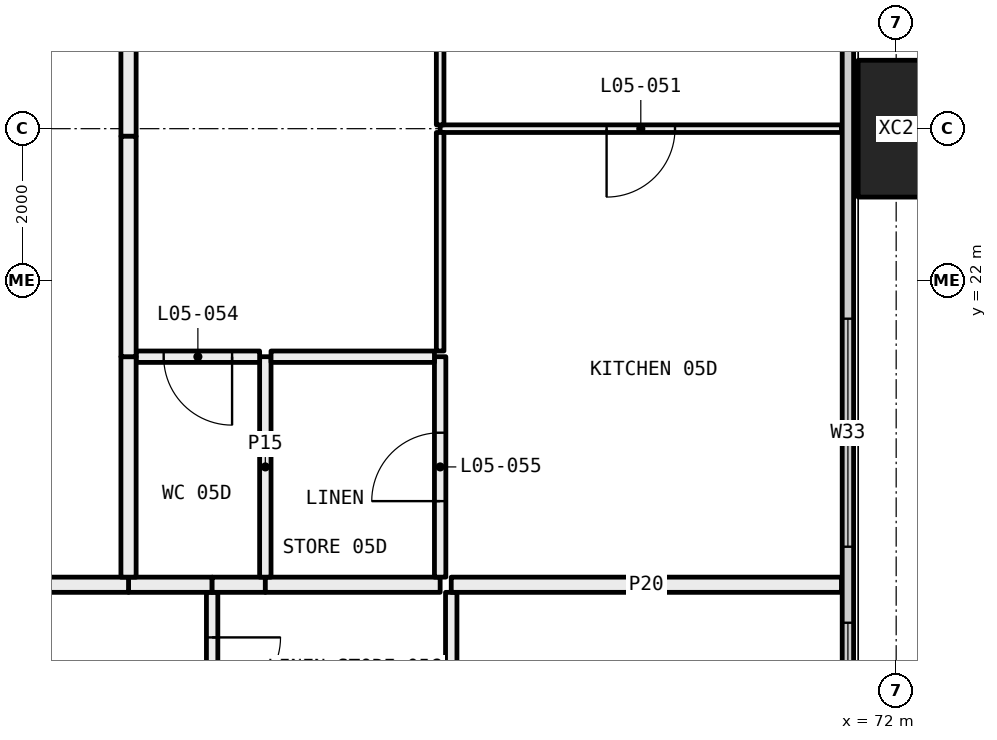
"""IFC4 building model, lengths in metres.
Left out: names, types, materials, properties, quantities, classifications, styles, units other than length and angle.
Written with IfcOpenShell. Run it as: python <this file> out.ifc"""

import sys

from ifc_helpers import new_model, si_unit, direction, frame, frame_2d, origin, origin_2d, place, context, subcontext, project, spatial, rectangle, hollow_rectangle, extrude, element, fill, save


model = new_model("IFC4")
c1 = context("Model", 3, precision=1e-05, world=origin(), true_north=direction((0.0, 1.0)))
c2 = subcontext(c1, "Body", "Model", "MODEL_VIEW")
j1 = project(units=[si_unit("LENGTHUNIT", "METRE"), si_unit("PLANEANGLEUNIT", "RADIAN")], contexts=[c1])
p1 = place(None, origin())
s1 = spatial("IfcSite", under=j1, at=p1, CompositionType="ELEMENT")
p2 = place(p1, origin())
s2 = spatial("IfcBuilding", under=s1, at=p2, CompositionType="ELEMENT")
p3 = place(p2, frame((0.0, 0.0, 30.0)))
s3 = spatial("IfcBuildingStorey", under=s2, at=p3, CompositionType="ELEMENT", Elevation=30.0)
p4 = place(p3, frame((72.0, 24.0, -0.4), z_axis=(0.0, 0.0, 1.0), x_axis=(0.0, 1.0, 0.0)))
e1 = element("IfcColumn", 1, at=p4, inside=s3, PredefinedType="COLUMN", context=c2, shape_type="SweptSolid", body=[
    extrude(hollow_rectangle(XDim=1.8, YDim=1.0, WallThickness=0.07, at=origin_2d()), origin(), (0.0, 0.0, 1.0), 3.45),
])
p5 = place(p3, frame((71.365, 6.71, 0.0), z_axis=(0.0, 0.0, 1.0), x_axis=(0.0, 1.0, 0.0)))
e2 = element("IfcWall", 2, at=p5, inside=s3, PredefinedType="ELEMENTEDWALL", context=c2, shape_type="SweptSolid", body=[
    extrude(rectangle(XDim=34.58, YDim=0.15, at=frame_2d((17.29, 0.0))), origin(), (0.0, 0.0, 1.0), 3.05),
])
p6 = place(p5, frame((0.29, 0.0, 0.45)))
e3 = element("IfcOpeningElement", 3, at=p6, cuts=e2, PredefinedType="OPENING", context=c2, shape_type="SweptSolid", body=[
    extrude(rectangle(XDim=4.5, YDim=2.55, at=frame_2d((2.25, 1.275))), frame((0.0, 0.085, 0.0), z_axis=(0.0, -1.0, 0.0), x_axis=(1.0, 0.0, 0.0)), (0.0, 0.0, 1.0), 0.17),
])
p7 = place(p5, frame((7.79, 0.0, 0.45)))
e4 = element("IfcOpeningElement", 4, at=p7, cuts=e2, PredefinedType="OPENING", context=c2, shape_type="SweptSolid", body=[
    extrude(rectangle(XDim=3.0, YDim=2.55, at=frame_2d((1.5, 1.275))), frame((0.0, 0.085, 0.0), z_axis=(0.0, -1.0, 0.0), x_axis=(1.0, 0.0, 0.0)), (0.0, 0.0, 1.0), 0.17),
])
p8 = place(p5, frame((11.79, 0.0, 0.45)))
e5 = element("IfcOpeningElement", 5, at=p8, cuts=e2, PredefinedType="OPENING", context=c2, shape_type="SweptSolid", body=[
    extrude(rectangle(XDim=3.0, YDim=2.55, at=frame_2d((1.5, 1.275))), frame((0.0, 0.085, 0.0), z_axis=(0.0, -1.0, 0.0), x_axis=(1.0, 0.0, 0.0)), (0.0, 0.0, 1.0), 0.17),
])
p9 = place(p5, frame((19.79, 0.0, 0.45)))
e6 = element("IfcOpeningElement", 6, at=p9, cuts=e2, PredefinedType="OPENING", context=c2, shape_type="SweptSolid", body=[
    extrude(rectangle(XDim=3.0, YDim=2.55, at=frame_2d((1.5, 1.275))), frame((0.0, 0.085, 0.0), z_axis=(0.0, -1.0, 0.0), x_axis=(1.0, 0.0, 0.0)), (0.0, 0.0, 1.0), 0.17),
])
p10 = place(p5, frame((23.79, 0.0, 0.45)))
e7 = element("IfcOpeningElement", 7, at=p10, cuts=e2, PredefinedType="OPENING", context=c2, shape_type="SweptSolid", body=[
    extrude(rectangle(XDim=2.0, YDim=2.55, at=frame_2d((1.0, 1.275))), frame((0.0, 0.085, 0.0), z_axis=(0.0, -1.0, 0.0), x_axis=(1.0, 0.0, 0.0)), (0.0, 0.0, 1.0), 0.17),
])
p11 = place(p5, frame((29.79, 0.0, 0.45)))
e8 = element("IfcOpeningElement", 8, at=p11, cuts=e2, PredefinedType="OPENING", context=c2, shape_type="SweptSolid", body=[
    extrude(rectangle(XDim=4.5, YDim=2.55, at=frame_2d((2.25, 1.275))), frame((0.0, 0.085, 0.0), z_axis=(0.0, -1.0, 0.0), x_axis=(1.0, 0.0, 0.0)), (0.0, 0.0, 1.0), 0.17),
])
p12 = place(p3, frame((63.0, 15.814, 0.0), z_axis=(0.0, 0.0, 1.0), x_axis=(0.0, 1.0, 0.0)))
e9 = element("IfcWall", 9, at=p12, inside=s3, PredefinedType="PARTITIONING", context=c2, shape_type="SweptSolid", body=[
    extrude(rectangle(XDim=2.086, YDim=0.15, at=frame_2d((1.043, 0.0))), origin(), (0.0, 0.0, 1.0), 3.05),
])
p13 = place(p12, frame((0.593, 0.0, 0.0)))
e10 = element("IfcOpeningElement", 10, at=p13, cuts=e9, PredefinedType="OPENING", context=c2, shape_type="SweptSolid", body=[
    extrude(rectangle(XDim=0.9, YDim=2.1, at=frame_2d((0.45, 1.05))), frame((0.0, 0.085, 0.0), z_axis=(0.0, -1.0, 0.0), x_axis=(1.0, 0.0, 0.0)), (0.0, 0.0, 1.0), 0.17),
])
p14 = place(p3, frame((63.0, 18.0, 0.0), z_axis=(0.0, 0.0, 1.0), x_axis=(-1.0, 0.0, 0.0)))
e11 = element("IfcWall", 11, at=p14, inside=s3, PredefinedType="PARTITIONING", context=c2, shape_type="SweptSolid", body=[
    extrude(rectangle(XDim=1.1, YDim=0.2, at=frame_2d((0.55, 0.0))), origin(), (0.0, 0.0, 1.0), 3.05),
])
p15 = place(p3, frame((61.9, 18.0, 0.0), z_axis=(0.0, 0.0, 1.0), x_axis=(-1.0, 0.0, 0.0)))
e12 = element("IfcWall", 12, at=p15, inside=s3, PredefinedType="PARTITIONING", context=c2, shape_type="SweptSolid", body=[
    extrude(rectangle(XDim=1.9, YDim=0.2, at=frame_2d((0.95, 0.0))), origin(), (0.0, 0.0, 1.0), 3.05),
])
p16 = place(p3, frame((66.146, 17.9, 0.0), z_axis=(0.0, 0.0, 1.0), x_axis=(0.0, -1.0, 0.0)))
e13 = element("IfcWall", 13, at=p16, inside=s3, PredefinedType="PARTITIONING", context=c2, shape_type="SweptSolid", body=[
    extrude(rectangle(XDim=2.086, YDim=0.15, at=frame_2d((1.043, 0.0))), origin(), (0.0, 0.0, 1.0), 2.55),
])
p17 = place(p3, frame((71.28, 18.0, 0.0), z_axis=(0.0, 0.0, 1.0), x_axis=(-1.0, 0.0, 0.0)))
e14 = element("IfcWall", 14, at=p17, inside=s3, PredefinedType="PARTITIONING", context=c2, shape_type="SweptSolid", body=[
    extrude(rectangle(XDim=5.134, YDim=0.2, at=frame_2d((2.567, 0.0))), origin(), (0.0, 0.0, 1.0), 3.05),
])
p18 = place(p3, frame((63.7, 18.0, 0.0), z_axis=(0.0, 0.0, 1.0), x_axis=(-1.0, 0.0, 0.0)))
e15 = element("IfcWall", 15, at=p18, inside=s3, PredefinedType="PARTITIONING", context=c2, shape_type="SweptSolid", body=[
    extrude(rectangle(XDim=0.7, YDim=0.2, at=frame_2d((0.35, 0.0))), origin(), (0.0, 0.0, 1.0), 3.05),
])
p19 = place(p3, frame((66.0, 18.0, 0.0), z_axis=(0.0, 0.0, 1.0), x_axis=(-1.0, 0.0, 0.0)))
e16 = element("IfcWall", 16, at=p19, inside=s3, PredefinedType="PARTITIONING", context=c2, shape_type="SweptSolid", body=[
    extrude(rectangle(XDim=2.3, YDim=0.2, at=frame_2d((1.15, 0.0))), origin(), (0.0, 0.0, 1.0), 3.05),
])
p20 = place(p3, frame((71.28, 24.0, 0.0), z_axis=(0.0, 0.0, 1.0), x_axis=(-1.0, 0.0, 0.0)))
e17 = element("IfcWall", 17, at=p20, inside=s3, PredefinedType="PARTITIONING", context=c2, shape_type="SweptSolid", body=[
    extrude(rectangle(XDim=5.28, YDim=0.1, at=frame_2d((2.64, 0.0))), origin(), (0.0, 0.0, 1.0), 2.45),
])
p21 = place(p20, frame((2.19, 0.0, 0.0)))
e18 = element("IfcOpeningElement", 18, at=p21, cuts=e17, PredefinedType="OPENING", context=c2, shape_type="SweptSolid", body=[
    extrude(rectangle(XDim=0.9, YDim=2.1, at=frame_2d((0.45, 1.05))), frame((0.0, 0.06, 0.0), z_axis=(0.0, -1.0, 0.0), x_axis=(1.0, 0.0, 0.0)), (0.0, 0.0, 1.0), 0.12),
])
p22 = place(p3, frame((66.0, 21.0, 0.0), z_axis=(0.0, 0.0, 1.0), x_axis=(0.0, -1.0, 0.0)))
e19 = element("IfcWall", 19, at=p22, inside=s3, PredefinedType="PARTITIONING", context=c2, shape_type="SweptSolid", body=[
    extrude(rectangle(XDim=2.9, YDim=0.15, at=frame_2d((1.45, 0.0))), origin(), (0.0, 0.0, 1.0), 3.05),
])
p23 = place(p22, frame((1.0, 0.0, 0.0)))
e20 = element("IfcOpeningElement", 20, at=p23, cuts=e19, PredefinedType="OPENING", context=c2, shape_type="SweptSolid", body=[
    extrude(rectangle(XDim=0.9, YDim=2.1, at=frame_2d((0.45, 1.05))), frame((0.0, 0.085, 0.0), z_axis=(0.0, -1.0, 0.0), x_axis=(1.0, 0.0, 0.0)), (0.0, 0.0, 1.0), 0.17),
])
p24 = place(p3, frame((66.0, 23.95, 0.0), z_axis=(0.0, 0.0, 1.0), x_axis=(0.0, -1.0, 0.0)))
e21 = element("IfcWall", 21, at=p24, inside=s3, PredefinedType="PARTITIONING", context=c2, shape_type="SweptSolid", body=[
    extrude(rectangle(XDim=2.875, YDim=0.1, at=frame_2d((1.438, 0.0))), origin(), (0.0, 0.0, 1.0), 2.45),
])
p25 = place(p3, frame((66.0, 33.0, 0.0), z_axis=(0.0, 0.0, 1.0), x_axis=(0.0, -1.0, 0.0)))
e22 = element("IfcWall", 22, at=p25, inside=s3, PredefinedType="PARTITIONING", context=c2, shape_type="SweptSolid", body=[
    extrude(rectangle(XDim=8.95, YDim=0.1, at=frame_2d((4.475, 0.0))), origin(), (0.0, 0.0, 1.0), 2.45),
])
p26 = place(p3, frame((63.7, 18.1, 0.0), z_axis=(0.0, 0.0, 1.0), x_axis=(0.0, 1.0, 0.0)))
e23 = element("IfcWall", 23, at=p26, inside=s3, PredefinedType="PARTITIONING", context=c2, shape_type="SweptSolid", body=[
    extrude(rectangle(XDim=2.9, YDim=0.15, at=frame_2d((1.45, 0.0))), origin(), (0.0, 0.0, 1.0), 3.05),
])
p27 = place(p3, frame((63.625, 21.0, 0.0), z_axis=(0.0, 0.0, 1.0), x_axis=(-1.0, 0.0, 0.0)))
e24 = element("IfcWall", 24, at=p27, inside=s3, PredefinedType="PARTITIONING", context=c2, shape_type="SweptSolid", body=[
    extrude(rectangle(XDim=1.625, YDim=0.15, at=frame_2d((0.812, 0.0))), origin(), (0.0, 0.0, 1.0), 3.05),
])
p28 = place(p27, frame((0.363, 0.0, 0.0)))
e25 = element("IfcOpeningElement", 25, at=p28, cuts=e24, PredefinedType="OPENING", context=c2, shape_type="SweptSolid", body=[
    extrude(rectangle(XDim=0.9, YDim=2.1, at=frame_2d((0.45, 1.05))), frame((0.0, 0.085, 0.0), z_axis=(0.0, -1.0, 0.0), x_axis=(1.0, 0.0, 0.0)), (0.0, 0.0, 1.0), 0.17),
])
p29 = place(p3, frame((61.9, 21.0, 0.0), z_axis=(0.0, 0.0, 1.0), x_axis=(0.0, -1.0, 0.0)))
e26 = element("IfcWall", 26, at=p29, inside=s3, PredefinedType="PARTITIONING", context=c2, shape_type="SweptSolid", body=[
    extrude(rectangle(XDim=2.9, YDim=0.2, at=frame_2d((1.45, 0.0))), origin(), (0.0, 0.0, 1.0), 3.05),
])
p30 = place(p3, frame((65.925, 21.0, 0.0), z_axis=(0.0, 0.0, 1.0), x_axis=(-1.0, 0.0, 0.0)))
e27 = element("IfcWall", 27, at=p30, inside=s3, PredefinedType="PARTITIONING", context=c2, shape_type="SweptSolid", body=[
    extrude(rectangle(XDim=2.15, YDim=0.15, at=frame_2d((1.075, 0.0))), origin(), (0.0, 0.0, 1.0), 3.05),
])
p31 = place(p3, frame((61.9, 33.0, 0.0), z_axis=(0.0, 0.0, 1.0), x_axis=(0.0, -1.0, 0.0)))
e28 = element("IfcWall", 28, at=p31, inside=s3, PredefinedType="PARTITIONING", context=c2, shape_type="SweptSolid", body=[
    extrude(rectangle(XDim=9.1, YDim=0.2, at=frame_2d((4.55, 0.0))), origin(), (0.0, 0.0, 1.0), 2.45),
])
p32 = place(p3, frame((61.9, 23.9, 0.0), z_axis=(0.0, 0.0, 1.0), x_axis=(0.0, -1.0, 0.0)))
e29 = element("IfcWall", 29, at=p32, inside=s3, PredefinedType="PARTITIONING", context=c2, shape_type="SweptSolid", body=[
    extrude(rectangle(XDim=2.9, YDim=0.2, at=frame_2d((1.45, 0.0))), origin(), (0.0, 0.0, 1.0), 3.05),
])
p33 = place(p7, origin())
e30 = element("IfcWindow", 30, at=p33, inside=s3, PartitioningType="SINGLE_PANEL", PredefinedType="WINDOW", context=c2, shape_type="SweptSolid", body=[
    extrude(rectangle(XDim=3.0, YDim=2.55, at=frame_2d((1.5, 1.275))), frame((0.0, 0.03, 0.0), z_axis=(0.0, -1.0, 0.0), x_axis=(1.0, 0.0, 0.0)), (0.0, 0.0, 1.0), 0.06),
])
fill(e4, e30)
p34 = place(p8, origin())
e31 = element("IfcWindow", 31, at=p34, inside=s3, PartitioningType="SINGLE_PANEL", PredefinedType="WINDOW", context=c2, shape_type="SweptSolid", body=[
    extrude(rectangle(XDim=3.0, YDim=2.55, at=frame_2d((1.5, 1.275))), frame((0.0, 0.03, 0.0), z_axis=(0.0, -1.0, 0.0), x_axis=(1.0, 0.0, 0.0)), (0.0, 0.0, 1.0), 0.06),
])
fill(e5, e31)
p35 = place(p13, frame((0.9, 0.0, 0.0), x_axis=(-1.0, 0.0, 0.0)))
e32 = element("IfcDoor", 32, at=p35, inside=s3, OperationType="SINGLE_SWING_RIGHT", PredefinedType="DOOR", context=c2, shape_type="SweptSolid", body=[
    extrude(rectangle(XDim=0.9, YDim=2.1, at=frame_2d((0.45, 1.05))), frame((0.0, 0.025, 0.0), z_axis=(0.0, -1.0, 0.0), x_axis=(1.0, 0.0, 0.0)), (0.0, 0.0, 1.0), 0.05),
])
fill(e10, e32)
p36 = place(p21, origin())
e33 = element("IfcDoor", 33, at=p36, inside=s3, OperationType="SINGLE_SWING_LEFT", PredefinedType="DOOR", context=c2, shape_type="SweptSolid", body=[
    extrude(rectangle(XDim=0.9, YDim=2.1, at=frame_2d((0.45, 1.05))), frame((0.0, 0.025, 0.0), z_axis=(0.0, -1.0, 0.0), x_axis=(1.0, 0.0, 0.0)), (0.0, 0.0, 1.0), 0.05),
])
fill(e18, e33)
p37 = place(p28, origin())
e34 = element("IfcDoor", 34, at=p37, inside=s3, OperationType="SINGLE_SWING_RIGHT", PredefinedType="DOOR", context=c2, shape_type="SweptSolid", body=[
    extrude(rectangle(XDim=0.9, YDim=2.1, at=frame_2d((0.45, 1.05))), frame((0.0, 0.025, 0.0), z_axis=(0.0, -1.0, 0.0), x_axis=(1.0, 0.0, 0.0)), (0.0, 0.0, 1.0), 0.05),
])
fill(e25, e34)
p38 = place(p23, frame((0.9, 0.0, 0.0), x_axis=(-1.0, 0.0, 0.0)))
e35 = element("IfcDoor", 35, at=p38, inside=s3, OperationType="SINGLE_SWING_RIGHT", PredefinedType="DOOR", context=c2, shape_type="SweptSolid", body=[
    extrude(rectangle(XDim=0.9, YDim=2.1, at=frame_2d((0.45, 1.05))), frame((0.0, 0.025, 0.0), z_axis=(0.0, -1.0, 0.0), x_axis=(1.0, 0.0, 0.0)), (0.0, 0.0, 1.0), 0.05),
])
fill(e20, e35)
save(model, sys.argv[1])
